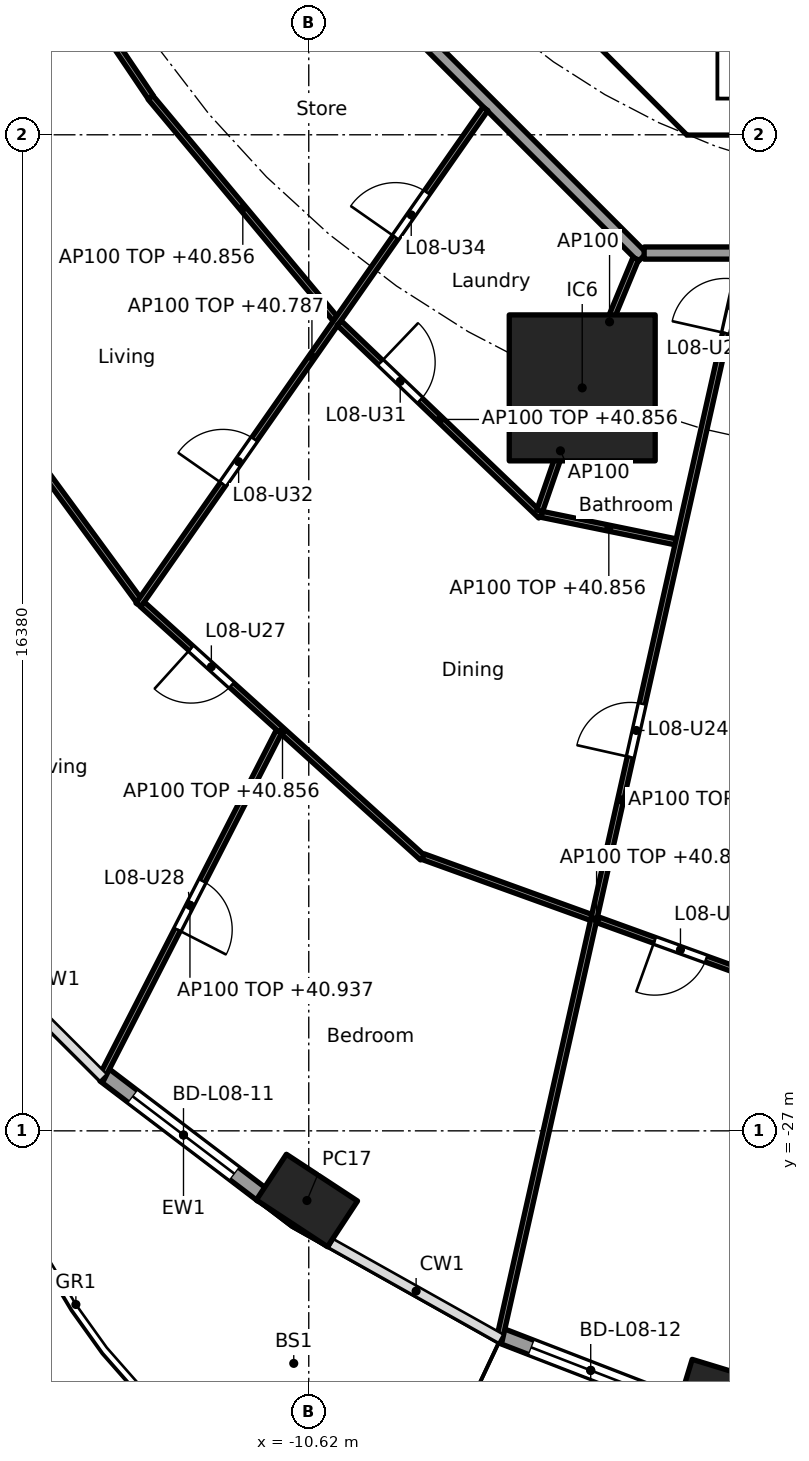
"""IFC4 building model, lengths in metres.
Left out: names, types, materials, properties, quantities, classifications, styles, units other than length and angle.
Written with IfcOpenShell. Run it as: python <this file> out.ifc"""

import sys

from ifc_helpers import new_model, si_unit, direction, frame, frame_2d, origin, origin_2d, place, context, subcontext, project, spatial, polyline, rectangle, hollow_rectangle, outline, extrude, element, fill, save


model = new_model("IFC4")
c1 = context("Model", 3, precision=1e-05, world=origin(), true_north=direction((0.0, 1.0)))
c2 = subcontext(c1, "Body", "Model", "MODEL_VIEW")
j1 = project(units=[si_unit("LENGTHUNIT", "METRE"), si_unit("PLANEANGLEUNIT", "RADIAN")], contexts=[c1])
p1 = place(None, origin())
s1 = spatial("IfcSite", under=j1, at=p1, CompositionType="ELEMENT")
p2 = place(p1, origin())
s2 = spatial("IfcBuilding", under=s1, at=p2, CompositionType="ELEMENT")
p3 = place(p2, frame((0.0, 0.0, 38.1)))
s3 = spatial("IfcBuildingStorey", under=s2, at=p3, CompositionType="ELEMENT", Elevation=38.1)
for number, where, z_axis, x_axis in (
    (1, (-10.65, -28.146, 0.0), (0.0, 0.0, 1.0), (0.836, -0.549, 0.0)),
    (2, (-3.776, -31.393, 0.0), (0.0, 0.0, 1.0), (0.957, -0.292, 0.0)),
):
    element("IfcColumn", number, at=place(p3, frame(where, z_axis=z_axis, x_axis=x_axis)), inside=s3, PredefinedType="COLUMN", context=c2, shape_type="SweptSolid", body=[
        extrude(hollow_rectangle(XDim=1.4, YDim=0.9, WallThickness=0.05, at=origin_2d()), origin(), (0.0, 0.0, 1.0), 3.7),
    ])
p4 = place(p3, frame((-6.123, -14.782, 0.0), z_axis=(0.0, 0.0, 1.0), x_axis=(1.0, 0.0, 0.0)))
e3 = element("IfcColumn", 3, at=p4, inside=s3, PredefinedType="COLUMN", context=c2, shape_type="SweptSolid", body=[
    extrude(rectangle(XDim=2.4, YDim=2.4, at=origin_2d()), origin(), (0.0, 0.0, 1.0), 3.7),
])
p5 = place(p3, frame((-11.382, -28.056, 0.0), z_axis=(0.0, 0.0, 1.0), x_axis=(-0.796022293214, 0.605267303517, 0.0)))
e4 = element("IfcWall", 4, at=p5, inside=s3, PredefinedType="SOLIDWALL", context=c2, shape_type="SweptSolid", body=[
    extrude(rectangle(XDim=3.262, YDim=0.25, at=frame_2d((1.631, 0.0))), origin(), (0.0, 0.0, 1.0), 3.44),
])
p6 = place(p5, frame((0.581, 0.0, 0.0)))
e5 = element("IfcOpeningElement", 5, at=p6, cuts=e4, PredefinedType="OPENING", context=c2, shape_type="SweptSolid", body=[
    extrude(rectangle(XDim=2.1, YDim=2.4, at=frame_2d((1.05, 1.2))), frame((0.0, 0.135, 0.0), z_axis=(0.0, -1.0, 0.0), x_axis=(1.0, 0.0, 0.0)), (0.0, 0.0, 1.0), 0.27),
])
p7 = place(p3, frame((-4.514, -31.507, 0.0), z_axis=(0.0, 0.0, 1.0), x_axis=(-0.932809381943, 0.360370166577, 0.0)))
e6 = element("IfcWall", 6, at=p7, inside=s3, PredefinedType="SOLIDWALL", context=c2, shape_type="SweptSolid", body=[
    extrude(rectangle(XDim=3.151, YDim=0.25, at=frame_2d((1.575, 0.0))), origin(), (0.0, 0.0, 1.0), 3.44),
])
p8 = place(p7, frame((0.525, 0.0, 0.0)))
e7 = element("IfcOpeningElement", 7, at=p8, cuts=e6, PredefinedType="OPENING", context=c2, shape_type="SweptSolid", body=[
    extrude(rectangle(XDim=2.1, YDim=2.4, at=frame_2d((1.05, 1.2))), frame((0.0, 0.135, 0.0), z_axis=(0.0, -1.0, 0.0), x_axis=(1.0, 0.0, 0.0)), (0.0, 0.0, 1.0), 0.27),
])
p9 = place(p3, frame((-9.988, -4.613, 0.0), z_axis=(0.0, 0.0, 1.0), x_axis=(0.707106781187, -0.707106781187, 0.0)))
e8 = element("IfcWall", 8, at=p9, inside=s3, PredefinedType="SHEAR", context=c2, shape_type="SweptSolid", body=[
    extrude(rectangle(XDim=7.602, YDim=0.6, at=frame_2d((3.801, 0.0))), origin(), (0.0, 0.0, 1.0), 3.44),
])
p10 = place(p9, frame((6.151, 0.0, 0.0)))
e9 = element("IfcOpeningElement", 9, at=p10, cuts=e8, PredefinedType="OPENING", context=c2, shape_type="SweptSolid", body=[
    extrude(rectangle(XDim=1.1, YDim=2.1, at=frame_2d((0.55, 1.05))), frame((0.0, 0.31, 0.0), z_axis=(0.0, -1.0, 0.0), x_axis=(1.0, 0.0, 0.0)), (0.0, 0.0, 1.0), 0.62),
])
p11 = place(p3, origin())
e10 = element("IfcWall", 10, at=p11, inside=s3, PredefinedType="SHEAR", context=c2, shape_type="SweptSolid", body=[
    extrude(outline(polyline([(-4.152, -10.025), (4.152, -10.025), (4.401, -9.776), (4.825, -10.2), (4.401, -10.625), (-4.401, -10.625), (-4.825, -10.2), (-4.401, -9.776), (-4.152, -10.025)])), origin(), (0.0, 0.0, 1.0), 3.44),
])
p12 = place(p3, origin())
e11 = element("IfcWall", 11, at=p12, inside=s3, PredefinedType="SOLIDWALL", context=c2, shape_type="SweptSolid", body=[
    extrude(outline(polyline([(-3.9, -10.025), (-4.1, -10.025), (-4.1, -7.025), (-3.9, -7.025), (-3.9, -10.025)])), origin(), (0.0, 0.0, 1.0), 3.44),
])
p13 = place(p3, frame((-12.635, -5.134, 0.0), z_axis=(0.0, 0.0, 1.0), x_axis=(0.707106781187, -0.707106781187, 0.0)))
e12 = element("IfcWall", 12, at=p13, inside=s3, PredefinedType="PARTITIONING", context=c2, shape_type="SweptSolid", body=[
    extrude(rectangle(XDim=10.609, YDim=0.2, at=frame_2d((5.305, 0.0))), origin(), (0.0, 0.0, 1.0), 3.44),
])
p14 = place(p3, frame((-5.104, -12.565, 0.0), z_axis=(0.0, 0.0, 1.0), x_axis=(1.0, 0.0, 0.0)))
e13 = element("IfcWall", 13, at=p14, inside=s3, PredefinedType="PARTITIONING", context=c2, shape_type="SweptSolid", body=[
    extrude(rectangle(XDim=10.409, YDim=0.2, at=frame_2d((5.205, 0.0))), origin(), (0.0, 0.0, 1.0), 3.44),
])
p15 = place(p14, frame((2.87, 0.0, 0.0)))
e14 = element("IfcOpeningElement", 14, at=p15, cuts=e13, PredefinedType="OPENING", context=c2, shape_type="SweptSolid", body=[
    extrude(rectangle(XDim=1.0, YDim=2.1, at=frame_2d((0.5, 1.05))), frame((0.0, 0.11, 0.0), z_axis=(0.0, -1.0, 0.0), x_axis=(1.0, 0.0, 0.0)), (0.0, 0.0, 1.0), 0.22),
])
p16 = place(p3, frame((-15.655, -6.391, 0.0), z_axis=(0.0, 0.0, 1.0), x_axis=(0.559126445155, -0.82908239538, 0.0)))
e15 = element("IfcWall", 15, at=p16, inside=s3, PredefinedType="PARTITIONING", context=c2, shape_type="SweptSolid", body=[
    extrude(rectangle(XDim=4.358, YDim=0.1, at=frame_2d((2.179, 0.0))), origin(), (0.0, 0.0, 1.0), 3.44),
])
p17 = place(p3, frame((-13.222, -10.007, 0.0), z_axis=(0.0, 0.0, 1.0), x_axis=(0.640807748916, -0.767701393075, 0.0)))
e16 = element("IfcWall", 16, at=p17, inside=s3, PredefinedType="PARTITIONING", context=c2, shape_type="SweptSolid", body=[
    extrude(rectangle(XDim=4.737, YDim=0.1, at=frame_2d((2.368, 0.0))), origin(), (0.0, 0.0, 1.0), 2.756),
])
p18 = place(p3, frame((-17.211, -13.1, 0.0), z_axis=(0.0, 0.0, 1.0), x_axis=(0.591206785834, -0.806520016109, 0.0)))
e17 = element("IfcWall", 17, at=p18, inside=s3, PredefinedType="PARTITIONING", context=c2, shape_type="SweptSolid", body=[
    extrude(rectangle(XDim=6.41, YDim=0.1, at=frame_2d((3.205, 0.0))), origin(), (0.0, 0.0, 1.0), 2.756),
])
p19 = place(p3, frame((-7.715, -10.193, 0.0), z_axis=(0.0, 0.0, 1.0), x_axis=(-0.573126502256, -0.819466907454, 0.0)))
e18 = element("IfcWall", 18, at=p19, inside=s3, PredefinedType="PARTITIONING", context=c2, shape_type="SweptSolid", body=[
    extrude(rectangle(XDim=9.954, YDim=0.1, at=frame_2d((4.977, 0.0))), origin(), (0.0, 0.0, 1.0), 2.687),
])
p20 = place(p19, frame((6.631, 0.0, 0.0)))
e19 = element("IfcOpeningElement", 19, at=p20, cuts=e18, PredefinedType="OPENING", context=c2, shape_type="SweptSolid", body=[
    extrude(rectangle(XDim=0.9, YDim=2.1, at=frame_2d((0.45, 1.05))), frame((0.0, 0.06, 0.0), z_axis=(0.0, -1.0, 0.0), x_axis=(1.0, 0.0, 0.0)), (0.0, 0.0, 1.0), 0.12),
])
p21 = place(p19, frame((1.678, 0.0, 0.0)))
e20 = element("IfcOpeningElement", 20, at=p21, cuts=e18, PredefinedType="OPENING", context=c2, shape_type="SweptSolid", body=[
    extrude(rectangle(XDim=0.9, YDim=2.1, at=frame_2d((0.45, 1.05))), frame((0.0, 0.06, 0.0), z_axis=(0.0, -1.0, 0.0), x_axis=(1.0, 0.0, 0.0)), (0.0, 0.0, 1.0), 0.12),
])
p22 = place(p3, frame((-10.119, -13.716, 0.0), z_axis=(0.0, 0.0, 1.0), x_axis=(0.722763212502, -0.69109575216, 0.0)))
e21 = element("IfcWall", 21, at=p22, inside=s3, PredefinedType="PARTITIONING", context=c2, shape_type="SweptSolid", body=[
    extrude(rectangle(XDim=4.587, YDim=0.1, at=frame_2d((2.293, 0.0))), origin(), (0.0, 0.0, 1.0), 2.756),
])
p23 = place(p22, frame((0.938, 0.0, 0.0)))
e22 = element("IfcOpeningElement", 22, at=p23, cuts=e21, PredefinedType="OPENING", context=c2, shape_type="SweptSolid", body=[
    extrude(rectangle(XDim=0.9, YDim=2.1, at=frame_2d((0.45, 1.05))), frame((0.0, 0.06, 0.0), z_axis=(0.0, -1.0, 0.0), x_axis=(1.0, 0.0, 0.0)), (0.0, 0.0, 1.0), 0.12),
])
p24 = place(p3, frame((-13.355, -18.343, 0.0), z_axis=(0.0, 0.0, 1.0), x_axis=(0.741720189244, -0.670709445936, 0.0)))
e23 = element("IfcWall", 23, at=p24, inside=s3, PredefinedType="PARTITIONING", context=c2, shape_type="SweptSolid", body=[
    extrude(rectangle(XDim=6.209, YDim=0.1, at=frame_2d((3.104, 0.0))), origin(), (0.0, 0.0, 1.0), 2.756),
])
p25 = place(p24, frame((1.077, 0.0, 0.0)))
e24 = element("IfcOpeningElement", 24, at=p25, cuts=e23, PredefinedType="OPENING", context=c2, shape_type="SweptSolid", body=[
    extrude(rectangle(XDim=0.9, YDim=2.1, at=frame_2d((0.45, 1.05))), frame((0.0, 0.06, 0.0), z_axis=(0.0, -1.0, 0.0), x_axis=(1.0, 0.0, 0.0)), (0.0, 0.0, 1.0), 0.12),
])
p26 = place(p3, frame((-11.112, -20.437, 0.0), z_axis=(0.0, 0.0, 1.0), x_axis=(-0.455901610863, -0.890030179945, 0.0)))
e25 = element("IfcWall", 25, at=p26, inside=s3, PredefinedType="PARTITIONING", context=c2, shape_type="SweptSolid", body=[
    extrude(rectangle(XDim=6.414, YDim=0.1, at=frame_2d((3.207, 0.0))), origin(), (0.0, 0.0, 1.0), 2.837),
])
p27 = place(p26, frame((2.757, 0.0, 0.0)))
e26 = element("IfcOpeningElement", 26, at=p27, cuts=e25, PredefinedType="OPENING", context=c2, shape_type="SweptSolid", body=[
    extrude(rectangle(XDim=0.9, YDim=2.1, at=frame_2d((0.45, 1.05))), frame((0.0, 0.06, 0.0), z_axis=(0.0, -1.0, 0.0), x_axis=(1.0, 0.0, 0.0)), (0.0, 0.0, 1.0), 0.12),
])
p28 = place(p3, frame((-5.243, -12.657, 0.0), z_axis=(0.0, 0.0, 1.0), x_axis=(-0.382719158442, -0.923864733477, 0.0)))
e27 = element("IfcWall", 27, at=p28, inside=s3, PredefinedType="PARTITIONING", context=c2, shape_type="SweptSolid", body=[
    extrude(rectangle(XDim=2.25, YDim=0.1, at=frame_2d((1.125, 0.0))), origin(), (0.0, 0.0, 1.0), 3.44),
])
p29 = place(p3, frame((-6.139, -14.83, 0.0), z_axis=(0.0, 0.0, 1.0), x_axis=(-0.327246993321, -0.944938836837, 0.0)))
e28 = element("IfcWall", 28, at=p29, inside=s3, PredefinedType="PARTITIONING", context=c2, shape_type="SweptSolid", body=[
    extrude(rectangle(XDim=2.09, YDim=0.1, at=frame_2d((1.045, 0.0))), origin(), (0.0, 0.0, 1.0), 3.44),
])
p30 = place(p3, frame((-6.791, -16.862, 0.0), z_axis=(0.0, 0.0, 1.0), x_axis=(0.979581941859, -0.201045316246, 0.0)))
e29 = element("IfcWall", 29, at=p30, inside=s3, PredefinedType="PARTITIONING", context=c2, shape_type="SweptSolid", body=[
    extrude(rectangle(XDim=2.256, YDim=0.1, at=frame_2d((1.128, 0.0))), origin(), (0.0, 0.0, 1.0), 2.756),
])
p31 = place(p3, frame((-8.739, -22.491, 0.0), z_axis=(0.0, 0.0, 1.0), x_axis=(0.940401691072, -0.340065669288, 0.0)))
e30 = element("IfcWall", 30, at=p31, inside=s3, PredefinedType="PARTITIONING", context=c2, shape_type="SweptSolid", body=[
    extrude(rectangle(XDim=6.067, YDim=0.1, at=frame_2d((3.034, 0.0))), origin(), (0.0, 0.0, 1.0), 2.756),
])
p32 = place(p31, frame((4.05, 0.0, 0.0)))
e31 = element("IfcOpeningElement", 31, at=p32, cuts=e30, PredefinedType="OPENING", context=c2, shape_type="SweptSolid", body=[
    extrude(rectangle(XDim=0.9, YDim=2.1, at=frame_2d((0.45, 1.05))), frame((0.0, 0.06, 0.0), z_axis=(0.0, -1.0, 0.0), x_axis=(1.0, 0.0, 0.0)), (0.0, 0.0, 1.0), 0.12),
])
p33 = place(p3, frame((-3.492, -12.662, 0.0), z_axis=(0.0, 0.0, 1.0), x_axis=(-0.219268088006, -0.975664648115, 0.0)))
e32 = element("IfcWall", 32, at=p33, inside=s3, PredefinedType="PARTITIONING", context=c2, shape_type="SweptSolid", body=[
    extrude(rectangle(XDim=18.23, YDim=0.1, at=frame_2d((9.115, 0.0))), origin(), (0.0, 0.0, 1.0), 2.687),
])
p34 = place(p33, frame((0.35, 0.0, 0.0)))
e33 = element("IfcOpeningElement", 33, at=p34, cuts=e32, PredefinedType="OPENING", context=c2, shape_type="SweptSolid", body=[
    extrude(rectangle(XDim=0.9, YDim=2.1, at=frame_2d((0.45, 1.05))), frame((0.0, 0.06, 0.0), z_axis=(0.0, -1.0, 0.0), x_axis=(1.0, 0.0, 0.0)), (0.0, 0.0, 1.0), 0.12),
])
p35 = place(p33, frame((7.497, 0.0, 0.0)))
e34 = element("IfcOpeningElement", 34, at=p35, cuts=e32, PredefinedType="OPENING", context=c2, shape_type="SweptSolid", body=[
    extrude(rectangle(XDim=0.9, YDim=2.1, at=frame_2d((0.45, 1.05))), frame((0.0, 0.06, 0.0), z_axis=(0.0, -1.0, 0.0), x_axis=(1.0, 0.0, 0.0)), (0.0, 0.0, 1.0), 0.12),
])
p36 = place(p6, origin())
e35 = element("IfcDoor", 35, at=p36, inside=s3, OperationType="SLIDING_TO_LEFT", PredefinedType="DOOR", context=c2, shape_type="SweptSolid", body=[
    extrude(rectangle(XDim=2.1, YDim=2.4, at=frame_2d((1.05, 1.2))), frame((0.0, 0.025, 0.0), z_axis=(0.0, -1.0, 0.0), x_axis=(1.0, 0.0, 0.0)), (0.0, 0.0, 1.0), 0.05),
])
fill(e5, e35)
p37 = place(p8, origin())
e36 = element("IfcDoor", 36, at=p37, inside=s3, OperationType="SLIDING_TO_LEFT", PredefinedType="DOOR", context=c2, shape_type="SweptSolid", body=[
    extrude(rectangle(XDim=2.1, YDim=2.4, at=frame_2d((1.05, 1.2))), frame((0.0, 0.025, 0.0), z_axis=(0.0, -1.0, 0.0), x_axis=(1.0, 0.0, 0.0)), (0.0, 0.0, 1.0), 0.05),
])
fill(e7, e36)
p38 = place(p10, origin())
e37 = element("IfcDoor", 37, at=p38, inside=s3, OperationType="SINGLE_SWING_RIGHT", PredefinedType="DOOR", context=c2, shape_type="SweptSolid", body=[
    extrude(rectangle(XDim=1.1, YDim=2.1, at=frame_2d((0.55, 1.05))), frame((0.0, 0.025, 0.0), z_axis=(0.0, -1.0, 0.0), x_axis=(1.0, 0.0, 0.0)), (0.0, 0.0, 1.0), 0.05),
])
fill(e9, e37)
p39 = place(p34, frame((0.9, 0.0, 0.0), x_axis=(-1.0, 0.0, 0.0)))
e38 = element("IfcDoor", 38, at=p39, inside=s3, OperationType="SINGLE_SWING_LEFT", PredefinedType="DOOR", context=c2, shape_type="SweptSolid", body=[
    extrude(rectangle(XDim=0.9, YDim=2.1, at=frame_2d((0.45, 1.05))), frame((0.0, 0.025, 0.0), z_axis=(0.0, -1.0, 0.0), x_axis=(1.0, 0.0, 0.0)), (0.0, 0.0, 1.0), 0.05),
])
fill(e33, e38)
p40 = place(p35, frame((0.9, 0.0, 0.0), x_axis=(-1.0, 0.0, 0.0)))
e39 = element("IfcDoor", 39, at=p40, inside=s3, OperationType="SINGLE_SWING_LEFT", PredefinedType="DOOR", context=c2, shape_type="SweptSolid", body=[
    extrude(rectangle(XDim=0.9, YDim=2.1, at=frame_2d((0.45, 1.05))), frame((0.0, 0.025, 0.0), z_axis=(0.0, -1.0, 0.0), x_axis=(1.0, 0.0, 0.0)), (0.0, 0.0, 1.0), 0.05),
])
fill(e34, e39)
p41 = place(p25, frame((0.9, 0.0, 0.0), x_axis=(-1.0, 0.0, 0.0)))
e40 = element("IfcDoor", 40, at=p41, inside=s3, OperationType="SINGLE_SWING_RIGHT", PredefinedType="DOOR", context=c2, shape_type="SweptSolid", body=[
    extrude(rectangle(XDim=0.9, YDim=2.1, at=frame_2d((0.45, 1.05))), frame((0.0, 0.025, 0.0), z_axis=(0.0, -1.0, 0.0), x_axis=(1.0, 0.0, 0.0)), (0.0, 0.0, 1.0), 0.05),
])
fill(e24, e40)
p42 = place(p27, origin())
e41 = element("IfcDoor", 41, at=p42, inside=s3, OperationType="SINGLE_SWING_RIGHT", PredefinedType="DOOR", context=c2, shape_type="SweptSolid", body=[
    extrude(rectangle(XDim=0.9, YDim=2.1, at=frame_2d((0.45, 1.05))), frame((0.0, 0.025, 0.0), z_axis=(0.0, -1.0, 0.0), x_axis=(1.0, 0.0, 0.0)), (0.0, 0.0, 1.0), 0.05),
])
fill(e26, e41)
p43 = place(p32, frame((0.9, 0.0, 0.0), x_axis=(-1.0, 0.0, 0.0)))
e42 = element("IfcDoor", 42, at=p43, inside=s3, OperationType="SINGLE_SWING_RIGHT", PredefinedType="DOOR", context=c2, shape_type="SweptSolid", body=[
    extrude(rectangle(XDim=0.9, YDim=2.1, at=frame_2d((0.45, 1.05))), frame((0.0, 0.025, 0.0), z_axis=(0.0, -1.0, 0.0), x_axis=(1.0, 0.0, 0.0)), (0.0, 0.0, 1.0), 0.05),
])
fill(e31, e42)
p44 = place(p23, origin())
e43 = element("IfcDoor", 43, at=p44, inside=s3, OperationType="SINGLE_SWING_LEFT", PredefinedType="DOOR", context=c2, shape_type="SweptSolid", body=[
    extrude(rectangle(XDim=0.9, YDim=2.1, at=frame_2d((0.45, 1.05))), frame((0.0, 0.025, 0.0), z_axis=(0.0, -1.0, 0.0), x_axis=(1.0, 0.0, 0.0)), (0.0, 0.0, 1.0), 0.05),
])
fill(e22, e43)
p45 = place(p20, frame((0.9, 0.0, 0.0), x_axis=(-1.0, 0.0, 0.0)))
e44 = element("IfcDoor", 44, at=p45, inside=s3, OperationType="SINGLE_SWING_LEFT", PredefinedType="DOOR", context=c2, shape_type="SweptSolid", body=[
    extrude(rectangle(XDim=0.9, YDim=2.1, at=frame_2d((0.45, 1.05))), frame((0.0, 0.025, 0.0), z_axis=(0.0, -1.0, 0.0), x_axis=(1.0, 0.0, 0.0)), (0.0, 0.0, 1.0), 0.05),
])
fill(e19, e44)
p46 = place(p21, frame((0.9, 0.0, 0.0), x_axis=(-1.0, 0.0, 0.0)))
e45 = element("IfcDoor", 45, at=p46, inside=s3, OperationType="SINGLE_SWING_LEFT", PredefinedType="DOOR", context=c2, shape_type="SweptSolid", body=[
    extrude(rectangle(XDim=0.9, YDim=2.1, at=frame_2d((0.45, 1.05))), frame((0.0, 0.025, 0.0), z_axis=(0.0, -1.0, 0.0), x_axis=(1.0, 0.0, 0.0)), (0.0, 0.0, 1.0), 0.05),
])
fill(e20, e45)
save(model, sys.argv[1])
